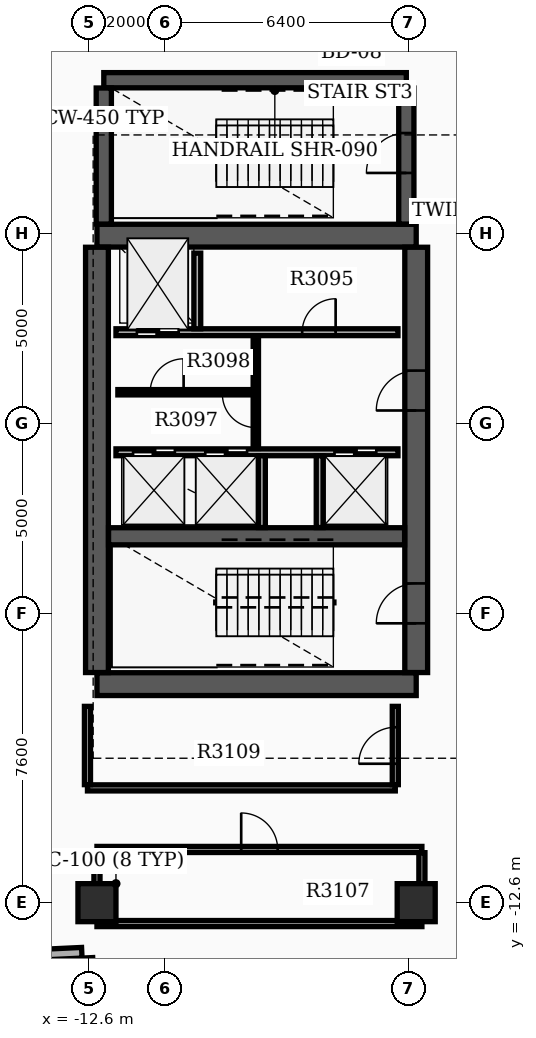
"""IFC4 building model, lengths in metres.
Left out: names, types, materials, properties, quantities, classifications, styles, units other than length and angle.
Written with IfcOpenShell. Run it as: python <this file> out.ifc"""

import sys

from ifc_helpers import new_model, si_unit, direction, frame, frame_2d, origin, origin_2d, place, context, subcontext, project, spatial, rectangle, extrude, element, fill, save


model = new_model("IFC4")
c1 = context("Model", 3, precision=1e-05, world=origin(), true_north=direction((0.0, 1.0)))
c2 = subcontext(c1, "Body", "Model", "MODEL_VIEW")
j1 = project(units=[si_unit("LENGTHUNIT", "METRE"), si_unit("PLANEANGLEUNIT", "RADIAN")], contexts=[c1])
p1 = place(None, origin())
s1 = spatial("IfcSite", under=j1, at=p1, CompositionType="ELEMENT")
p2 = place(p1, origin())
s2 = spatial("IfcBuilding", under=s1, at=p2, CompositionType="ELEMENT")
p3 = place(p2, frame((0.0, 0.0, 196.8)))
s3 = spatial("IfcBuildingStorey", under=s2, at=p3, CompositionType="ELEMENT", Elevation=196.8)
for number, where, z_axis, x_axis in (
    (1, (-12.4, -6.85, 0.0), (0.0, 0.0, 1.0), (1.0, 0.0, 0.0)),
    (2, (-12.4, 4.95, 0.0), (0.0, 0.0, 1.0), (1.0, 0.0, 0.0)),
):
    element("IfcWall", number, at=place(p3, frame(where, z_axis=z_axis, x_axis=x_axis)), inside=s3, PredefinedType="SHEAR", context=c2, shape_type="SweptSolid", body=[
        extrude(rectangle(XDim=8.4, YDim=0.6, at=frame_2d((4.2, 0.0))), origin(), (0.0, 0.0, 1.0), 4.3),
    ])
p4 = place(p3, frame((-12.4, -6.545, 0.0), z_axis=(0.0, 0.0, 1.0), x_axis=(0.0, 1.0, 0.0)))
e3 = element("IfcWall", 3, at=p4, inside=s3, PredefinedType="SHEAR", context=c2, shape_type="SweptSolid", body=[
    extrude(rectangle(XDim=11.19, YDim=0.6, at=frame_2d((5.595, 0.0))), origin(), (0.0, 0.0, 1.0), 4.3),
])
p5 = place(p3, frame((-4.0, -6.545, 0.0), z_axis=(0.0, 0.0, 1.0), x_axis=(0.0, 1.0, 0.0)))
e4 = element("IfcWall", 4, at=p5, inside=s3, PredefinedType="SHEAR", context=c2, shape_type="SweptSolid", body=[
    extrude(rectangle(XDim=11.19, YDim=0.6, at=frame_2d((5.595, 0.0))), origin(), (0.0, 0.0, 1.0), 4.3),
])
p6 = place(p5, frame((1.295, 0.0, 0.0)))
e5 = element("IfcOpeningElement", 5, at=p6, cuts=e4, PredefinedType="OPENING", context=c2, shape_type="SweptSolid", body=[
    extrude(rectangle(XDim=1.05, YDim=2.15, at=frame_2d((0.525, 1.075))), frame((0.0, 0.31, 0.0), z_axis=(0.0, -1.0, 0.0), x_axis=(1.0, 0.0, 0.0)), (0.0, 0.0, 1.0), 0.62),
])
p7 = place(p5, frame((6.895, 0.0, 0.0)))
e6 = element("IfcOpeningElement", 6, at=p7, cuts=e4, PredefinedType="OPENING", context=c2, shape_type="SweptSolid", body=[
    extrude(rectangle(XDim=1.05, YDim=2.15, at=frame_2d((0.525, 1.075))), frame((0.0, 0.31, 0.0), z_axis=(0.0, -1.0, 0.0), x_axis=(1.0, 0.0, 0.0)), (0.0, 0.0, 1.0), 0.62),
])
p8 = place(p3, frame((-12.095, -2.96, 0.0), z_axis=(0.0, 0.0, 1.0), x_axis=(1.0, 0.0, 0.0)))
e7 = element("IfcWall", 7, at=p8, inside=s3, PredefinedType="SHEAR", context=c2, shape_type="SweptSolid", body=[
    extrude(rectangle(XDim=7.79, YDim=0.45, at=frame_2d((3.895, 0.0))), origin(), (0.0, 0.0, 1.0), 4.3),
])
p9 = place(p3, frame((-12.22, 9.04, 0.0), z_axis=(0.0, 0.0, 1.0), x_axis=(1.0, 0.0, 0.0)))
e8 = element("IfcWall", 8, at=p9, inside=s3, PredefinedType="SHEAR", context=c2, shape_type="SweptSolid", body=[
    extrude(rectangle(XDim=7.96, YDim=0.4, at=frame_2d((3.98, 0.0))), origin(), (0.0, 0.0, 1.0), 4.3),
])
p10 = place(p3, frame((-12.22, 5.255, 0.0), z_axis=(0.0, 0.0, 1.0), x_axis=(0.0, 1.0, 0.0)))
e9 = element("IfcWall", 9, at=p10, inside=s3, PredefinedType="SHEAR", context=c2, shape_type="SweptSolid", body=[
    extrude(rectangle(XDim=3.58, YDim=0.4, at=frame_2d((1.79, 0.0))), origin(), (0.0, 0.0, 1.0), 4.3),
])
p11 = place(p3, frame((-4.26, 5.255, 0.0), z_axis=(0.0, 0.0, 1.0), x_axis=(0.0, 1.0, 0.0)))
e10 = element("IfcWall", 10, at=p11, inside=s3, PredefinedType="SHEAR", context=c2, shape_type="SweptSolid", body=[
    extrude(rectangle(XDim=3.58, YDim=0.4, at=frame_2d((1.79, 0.0))), origin(), (0.0, 0.0, 1.0), 4.3),
])
p12 = place(p11, frame((1.345, 0.0, 0.0)))
e11 = element("IfcOpeningElement", 11, at=p12, cuts=e10, PredefinedType="OPENING", context=c2, shape_type="SweptSolid", body=[
    extrude(rectangle(XDim=1.05, YDim=2.15, at=frame_2d((0.525, 1.075))), frame((0.0, 0.21, 0.0), z_axis=(0.0, -1.0, 0.0), x_axis=(1.0, 0.0, 0.0)), (0.0, 0.0, 1.0), 0.42),
])
for number, where, z_axis, x_axis in (
    (12, (-12.4, -12.6, 0.0), (0.0, 0.0, 1.0), (1.0, 0.0, 0.0)),
    (13, (-4.0, -12.6, 0.0), (0.0, 0.0, 1.0), (1.0, 0.0, 0.0)),
):
    element("IfcColumn", number, at=place(p3, frame(where, z_axis=z_axis, x_axis=x_axis)), inside=s3, PredefinedType="COLUMN", context=c2, shape_type="SweptSolid", body=[
        extrude(rectangle(XDim=1.0, YDim=1.0, at=origin_2d()), origin(), (0.0, 0.0, 1.0), 4.5),
    ])
p13 = place(p3, frame((-14.017, -13.976, 0.0), z_axis=(0.0, 0.0, 1.0), x_axis=(0.998883930236, 0.047232339719, 0.0)))
e14 = element("IfcWall", 14, at=p13, inside=s3, PredefinedType="STANDARD", context=c2, shape_type="SweptSolid", body=[
    extrude(rectangle(XDim=1.22, YDim=0.28, at=frame_2d((0.61, 0.0))), origin(), (0.0, 0.0, 1.0), 3.38),
])
p14 = place(p3, frame((-12.652, -14.052, 0.0), z_axis=(0.0, 0.0, 1.0), x_axis=(0.047039284441, -0.99889304018, 0.0)))
e15 = element("IfcWall", 15, at=p14, inside=s3, PredefinedType="STANDARD", context=c2, shape_type="SweptSolid", body=[
    extrude(rectangle(XDim=1.5, YDim=0.28, at=frame_2d((0.75, 0.0))), origin(), (0.0, 0.0, 1.0), 3.38),
])
p15 = place(p3, frame((-11.9, 2.41, 0.0), z_axis=(0.0, 0.0, 1.0), x_axis=(1.0, 0.0, 0.0)))
e16 = element("IfcWall", 16, at=p15, inside=s3, PredefinedType="SOLIDWALL", context=c2, shape_type="SweptSolid", body=[
    extrude(rectangle(XDim=7.42, YDim=0.18, at=frame_2d((3.71, 0.0))), origin(), (0.0, 0.0, 1.0), 3.37),
])
p16 = place(p15, frame((0.55, 0.0, 0.0)))
e17 = element("IfcOpeningElement", 17, at=p16, cuts=e16, PredefinedType="OPENING", context=c2, shape_type="SweptSolid", body=[
    extrude(rectangle(XDim=1.1, YDim=2.15, at=frame_2d((0.55, 1.075))), frame((0.0, 0.1, 0.0), z_axis=(0.0, -1.0, 0.0), x_axis=(1.0, 0.0, 0.0)), (0.0, 0.0, 1.0), 0.2),
])
p17 = place(p15, frame((4.9, 0.0, 0.0)))
e18 = element("IfcOpeningElement", 18, at=p17, cuts=e16, PredefinedType="OPENING", context=c2, shape_type="SweptSolid", body=[
    extrude(rectangle(XDim=0.88, YDim=2.1, at=frame_2d((0.44, 1.05))), frame((0.0, 0.1, 0.0), z_axis=(0.0, -1.0, 0.0), x_axis=(1.0, 0.0, 0.0)), (0.0, 0.0, 1.0), 0.2),
])
p18 = place(p3, frame((-11.9, -0.75, 0.0), z_axis=(0.0, 0.0, 1.0), x_axis=(1.0, 0.0, 0.0)))
e19 = element("IfcWall", 19, at=p18, inside=s3, PredefinedType="SOLIDWALL", context=c2, shape_type="SweptSolid", body=[
    extrude(rectangle(XDim=7.42, YDim=0.18, at=frame_2d((3.71, 0.0))), origin(), (0.0, 0.0, 1.0), 3.37),
])
p19 = place(p18, frame((0.45, 0.0, 0.0)))
e20 = element("IfcOpeningElement", 20, at=p19, cuts=e19, PredefinedType="OPENING", context=c2, shape_type="SweptSolid", body=[
    extrude(rectangle(XDim=1.1, YDim=2.15, at=frame_2d((0.55, 1.075))), frame((0.0, 0.1, 0.0), z_axis=(0.0, -1.0, 0.0), x_axis=(1.0, 0.0, 0.0)), (0.0, 0.0, 1.0), 0.2),
])
p20 = place(p18, frame((2.35, 0.0, 0.0)))
e21 = element("IfcOpeningElement", 21, at=p20, cuts=e19, PredefinedType="OPENING", context=c2, shape_type="SweptSolid", body=[
    extrude(rectangle(XDim=1.1, YDim=2.15, at=frame_2d((0.55, 1.075))), frame((0.0, 0.1, 0.0), z_axis=(0.0, -1.0, 0.0), x_axis=(1.0, 0.0, 0.0)), (0.0, 0.0, 1.0), 0.2),
])
p21 = place(p18, frame((5.75, 0.0, 0.0)))
e22 = element("IfcOpeningElement", 22, at=p21, cuts=e19, PredefinedType="OPENING", context=c2, shape_type="SweptSolid", body=[
    extrude(rectangle(XDim=1.1, YDim=2.15, at=frame_2d((0.55, 1.075))), frame((0.0, 0.1, 0.0), z_axis=(0.0, -1.0, 0.0), x_axis=(1.0, 0.0, 0.0)), (0.0, 0.0, 1.0), 0.2),
])
p22 = place(p3, frame((-9.76, 2.5, 0.0), z_axis=(0.0, 0.0, 1.0), x_axis=(0.0, 1.0, 0.0)))
e23 = element("IfcWall", 23, at=p22, inside=s3, PredefinedType="SOLIDWALL", context=c2, shape_type="SweptSolid", body=[
    extrude(rectangle(XDim=1.99, YDim=0.18, at=frame_2d((0.995, 0.0))), origin(), (0.0, 0.0, 1.0), 3.37),
])
for number, where, z_axis, x_axis in (
    (24, (-8.06, -2.73, 0.0), (0.0, 0.0, 1.0), (0.0, 1.0, 0.0)),
    (25, (-6.54, -2.73, 0.0), (0.0, 0.0, 1.0), (0.0, 1.0, 0.0)),
):
    element("IfcWall", number, at=place(p3, frame(where, z_axis=z_axis, x_axis=x_axis)), inside=s3, PredefinedType="SOLIDWALL", context=c2, shape_type="SweptSolid", body=[
        extrude(rectangle(XDim=1.89, YDim=0.18, at=frame_2d((0.945, 0.0))), origin(), (0.0, 0.0, 1.0), 3.37),
    ])
p23 = place(p3, frame((-8.22, -0.65, 0.0), z_axis=(0.0, 0.0, 1.0), x_axis=(0.0, 1.0, 0.0)))
e26 = element("IfcWall", 26, at=p23, inside=s3, PredefinedType="SOLIDWALL", context=c2, shape_type="SweptSolid", body=[
    extrude(rectangle(XDim=2.96, YDim=0.14, at=frame_2d((1.48, 0.0))), origin(), (0.0, 0.0, 1.0), 3.37),
])
p24 = place(p23, frame((0.55, 0.0, 0.0)))
e27 = element("IfcOpeningElement", 27, at=p24, cuts=e26, PredefinedType="OPENING", context=c2, shape_type="SweptSolid", body=[
    extrude(rectangle(XDim=0.88, YDim=2.1, at=frame_2d((0.44, 1.05))), frame((0.0, 0.08, 0.0), z_axis=(0.0, -1.0, 0.0), x_axis=(1.0, 0.0, 0.0)), (0.0, 0.0, 1.0), 0.16),
])
p25 = place(p3, frame((-11.85, 0.83, 0.0), z_axis=(0.0, 0.0, 1.0), x_axis=(1.0, 0.0, 0.0)))
e28 = element("IfcWall", 28, at=p25, inside=s3, PredefinedType="PARTITIONING", context=c2, shape_type="SweptSolid", body=[
    extrude(rectangle(XDim=3.552, YDim=0.14, at=frame_2d((1.776, 0.0))), origin(), (0.0, 0.0, 1.0), 3.37),
])
p26 = place(p25, frame((0.85, 0.0, 0.0)))
e29 = element("IfcOpeningElement", 29, at=p26, cuts=e28, PredefinedType="OPENING", context=c2, shape_type="SweptSolid", body=[
    extrude(rectangle(XDim=0.88, YDim=2.1, at=frame_2d((0.44, 1.05))), frame((0.0, 0.08, 0.0), z_axis=(0.0, -1.0, 0.0), x_axis=(1.0, 0.0, 0.0)), (0.0, 0.0, 1.0), 0.16),
])
p27 = place(p3, frame((-12.4, -13.15, 0.0), z_axis=(0.0, 0.0, 1.0), x_axis=(1.0, 0.0, 0.0)))
e30 = element("IfcWall", 30, at=p27, inside=s3, PredefinedType="PARTITIONING", context=c2, shape_type="SweptSolid", body=[
    extrude(rectangle(XDim=8.55, YDim=0.16, at=frame_2d((4.275, 0.0))), origin(), (0.0, 0.0, 1.0), 3.37),
])
p28 = place(p3, frame((-12.4, -11.2, 0.0), z_axis=(0.0, 0.0, 1.0), x_axis=(1.0, 0.0, 0.0)))
e31 = element("IfcWall", 31, at=p28, inside=s3, PredefinedType="PARTITIONING", context=c2, shape_type="SweptSolid", body=[
    extrude(rectangle(XDim=8.55, YDim=0.16, at=frame_2d((4.275, 0.0))), origin(), (0.0, 0.0, 1.0), 3.37),
])
p29 = place(p28, frame((3.795, 0.0, 0.0)))
e32 = element("IfcOpeningElement", 32, at=p29, cuts=e31, PredefinedType="OPENING", context=c2, shape_type="SweptSolid", body=[
    extrude(rectangle(XDim=0.96, YDim=2.15, at=frame_2d((0.48, 1.075))), frame((0.0, 0.09, 0.0), z_axis=(0.0, -1.0, 0.0), x_axis=(1.0, 0.0, 0.0)), (0.0, 0.0, 1.0), 0.18),
])
for number, where, z_axis, x_axis in (
    (33, (-12.4, -13.065, 0.0), (0.0, 0.0, 1.0), (0.0, 1.0, 0.0)),
    (34, (-3.85, -13.065, 0.0), (0.0, 0.0, 1.0), (0.0, 1.0, 0.0)),
):
    element("IfcWall", number, at=place(p3, frame(where, z_axis=z_axis, x_axis=x_axis)), inside=s3, PredefinedType="PARTITIONING", context=c2, shape_type="SweptSolid", body=[
        extrude(rectangle(XDim=1.78, YDim=0.16, at=frame_2d((0.89, 0.0))), origin(), (0.0, 0.0, 1.0), 3.37),
    ])
p30 = place(p3, frame((-12.65, -9.58, 0.0), z_axis=(0.0, 0.0, 1.0), x_axis=(1.0, 0.0, 0.0)))
e35 = element("IfcWall", 35, at=p30, inside=s3, PredefinedType="PARTITIONING", context=c2, shape_type="SweptSolid", body=[
    extrude(rectangle(XDim=8.1, YDim=0.16, at=frame_2d((4.05, 0.0))), origin(), (0.0, 0.0, 1.0), 3.37),
])
p31 = place(p3, frame((-12.65, -9.495, 0.0), z_axis=(0.0, 0.0, 1.0), x_axis=(0.0, 1.0, 0.0)))
e36 = element("IfcWall", 36, at=p31, inside=s3, PredefinedType="PARTITIONING", context=c2, shape_type="SweptSolid", body=[
    extrude(rectangle(XDim=2.06, YDim=0.16, at=frame_2d((1.03, 0.0))), origin(), (0.0, 0.0, 1.0), 3.37),
])
p32 = place(p3, frame((-4.55, -9.495, 0.0), z_axis=(0.0, 0.0, 1.0), x_axis=(0.0, 1.0, 0.0)))
e37 = element("IfcWall", 37, at=p32, inside=s3, PredefinedType="PARTITIONING", context=c2, shape_type="SweptSolid", body=[
    extrude(rectangle(XDim=2.06, YDim=0.16, at=frame_2d((1.03, 0.0))), origin(), (0.0, 0.0, 1.0), 3.37),
])
p33 = place(p32, frame((0.55, 0.0, 0.0)))
e38 = element("IfcOpeningElement", 38, at=p33, cuts=e37, PredefinedType="OPENING", context=c2, shape_type="SweptSolid", body=[
    extrude(rectangle(XDim=0.96, YDim=2.15, at=frame_2d((0.48, 1.075))), frame((0.0, 0.09, 0.0), z_axis=(0.0, -1.0, 0.0), x_axis=(1.0, 0.0, 0.0)), (0.0, 0.0, 1.0), 0.18),
])
p34 = place(p6, origin())
e39 = element("IfcDoor", 39, at=p34, inside=s3, OperationType="SINGLE_SWING_LEFT", PredefinedType="DOOR", context=c2, shape_type="SweptSolid", body=[
    extrude(rectangle(XDim=1.05, YDim=2.15, at=frame_2d((0.525, 1.075))), frame((0.0, 0.025, 0.0), z_axis=(0.0, -1.0, 0.0), x_axis=(1.0, 0.0, 0.0)), (0.0, 0.0, 1.0), 0.05),
])
fill(e5, e39)
p35 = place(p7, origin())
e40 = element("IfcDoor", 40, at=p35, inside=s3, OperationType="SINGLE_SWING_LEFT", PredefinedType="DOOR", context=c2, shape_type="SweptSolid", body=[
    extrude(rectangle(XDim=1.05, YDim=2.15, at=frame_2d((0.525, 1.075))), frame((0.0, 0.025, 0.0), z_axis=(0.0, -1.0, 0.0), x_axis=(1.0, 0.0, 0.0)), (0.0, 0.0, 1.0), 0.05),
])
fill(e6, e40)
p36 = place(p12, origin())
e41 = element("IfcDoor", 41, at=p36, inside=s3, OperationType="SINGLE_SWING_LEFT", PredefinedType="DOOR", context=c2, shape_type="SweptSolid", body=[
    extrude(rectangle(XDim=1.05, YDim=2.15, at=frame_2d((0.525, 1.075))), frame((0.0, 0.025, 0.0), z_axis=(0.0, -1.0, 0.0), x_axis=(1.0, 0.0, 0.0)), (0.0, 0.0, 1.0), 0.05),
])
fill(e11, e41)
p37 = place(p16, origin())
e42 = element("IfcDoor", 42, at=p37, inside=s3, OperationType="DOUBLE_DOOR_SLIDING", PredefinedType="DOOR", context=c2, shape_type="SweptSolid", body=[
    extrude(rectangle(XDim=1.1, YDim=2.15, at=frame_2d((0.55, 1.075))), frame((0.0, 0.025, 0.0), z_axis=(0.0, -1.0, 0.0), x_axis=(1.0, 0.0, 0.0)), (0.0, 0.0, 1.0), 0.05),
])
fill(e17, e42)
p38 = place(p19, origin())
e43 = element("IfcDoor", 43, at=p38, inside=s3, OperationType="DOUBLE_DOOR_SLIDING", PredefinedType="DOOR", context=c2, shape_type="SweptSolid", body=[
    extrude(rectangle(XDim=1.1, YDim=2.15, at=frame_2d((0.55, 1.075))), frame((0.0, 0.025, 0.0), z_axis=(0.0, -1.0, 0.0), x_axis=(1.0, 0.0, 0.0)), (0.0, 0.0, 1.0), 0.05),
])
fill(e20, e43)
p39 = place(p20, origin())
e44 = element("IfcDoor", 44, at=p39, inside=s3, OperationType="DOUBLE_DOOR_SLIDING", PredefinedType="DOOR", context=c2, shape_type="SweptSolid", body=[
    extrude(rectangle(XDim=1.1, YDim=2.15, at=frame_2d((0.55, 1.075))), frame((0.0, 0.025, 0.0), z_axis=(0.0, -1.0, 0.0), x_axis=(1.0, 0.0, 0.0)), (0.0, 0.0, 1.0), 0.05),
])
fill(e21, e44)
p40 = place(p21, origin())
e45 = element("IfcDoor", 45, at=p40, inside=s3, OperationType="DOUBLE_DOOR_SLIDING", PredefinedType="DOOR", context=c2, shape_type="SweptSolid", body=[
    extrude(rectangle(XDim=1.1, YDim=2.15, at=frame_2d((0.55, 1.075))), frame((0.0, 0.025, 0.0), z_axis=(0.0, -1.0, 0.0), x_axis=(1.0, 0.0, 0.0)), (0.0, 0.0, 1.0), 0.05),
])
fill(e22, e45)
p41 = place(p17, origin())
e46 = element("IfcDoor", 46, at=p41, inside=s3, OperationType="SINGLE_SWING_RIGHT", PredefinedType="DOOR", context=c2, shape_type="SweptSolid", body=[
    extrude(rectangle(XDim=0.88, YDim=2.1, at=frame_2d((0.44, 1.05))), frame((0.0, 0.025, 0.0), z_axis=(0.0, -1.0, 0.0), x_axis=(1.0, 0.0, 0.0)), (0.0, 0.0, 1.0), 0.05),
])
fill(e18, e46)
p42 = place(p24, origin())
e47 = element("IfcDoor", 47, at=p42, inside=s3, OperationType="SINGLE_SWING_RIGHT", PredefinedType="DOOR", context=c2, shape_type="SweptSolid", body=[
    extrude(rectangle(XDim=0.88, YDim=2.1, at=frame_2d((0.44, 1.05))), frame((0.0, 0.025, 0.0), z_axis=(0.0, -1.0, 0.0), x_axis=(1.0, 0.0, 0.0)), (0.0, 0.0, 1.0), 0.05),
])
fill(e27, e47)
p43 = place(p26, origin())
e48 = element("IfcDoor", 48, at=p43, inside=s3, OperationType="SINGLE_SWING_RIGHT", PredefinedType="DOOR", context=c2, shape_type="SweptSolid", body=[
    extrude(rectangle(XDim=0.88, YDim=2.1, at=frame_2d((0.44, 1.05))), frame((0.0, 0.025, 0.0), z_axis=(0.0, -1.0, 0.0), x_axis=(1.0, 0.0, 0.0)), (0.0, 0.0, 1.0), 0.05),
])
fill(e29, e48)
p44 = place(p29, origin())
e49 = element("IfcDoor", 49, at=p44, inside=s3, OperationType="SINGLE_SWING_LEFT", PredefinedType="DOOR", context=c2, shape_type="SweptSolid", body=[
    extrude(rectangle(XDim=0.96, YDim=2.15, at=frame_2d((0.48, 1.075))), frame((0.0, 0.025, 0.0), z_axis=(0.0, -1.0, 0.0), x_axis=(1.0, 0.0, 0.0)), (0.0, 0.0, 1.0), 0.05),
])
fill(e32, e49)
p45 = place(p33, origin())
e50 = element("IfcDoor", 50, at=p45, inside=s3, OperationType="SINGLE_SWING_LEFT", PredefinedType="DOOR", context=c2, shape_type="SweptSolid", body=[
    extrude(rectangle(XDim=0.96, YDim=2.15, at=frame_2d((0.48, 1.075))), frame((0.0, 0.025, 0.0), z_axis=(0.0, -1.0, 0.0), x_axis=(1.0, 0.0, 0.0)), (0.0, 0.0, 1.0), 0.05),
])
fill(e38, e50)
save(model, sys.argv[1])
